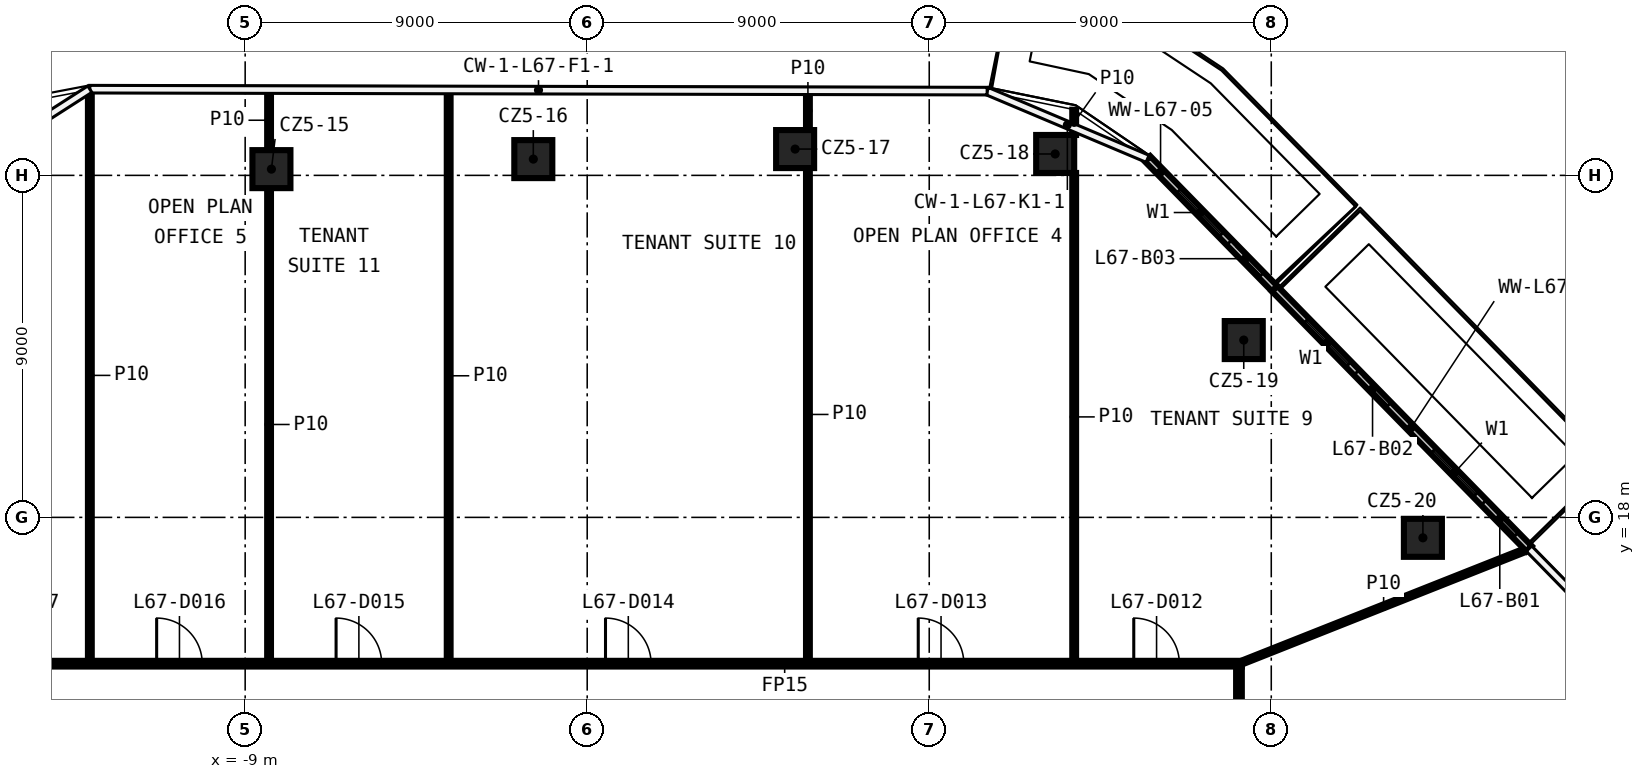
"""IFC4 building model, lengths in metres.
Left out: names, types, materials, properties, quantities, classifications, styles, units other than length and angle.
Written with IfcOpenShell. Run it as: python <this file> out.ifc"""

import sys

from ifc_helpers import new_model, si_unit, direction, frame, frame_2d, origin, origin_2d, place, context, subcontext, project, spatial, rectangle, extrude, element, fill, save


model = new_model("IFC4")
c1 = context("Model", 3, precision=1e-05, world=origin(), true_north=direction((0.0, 1.0)))
c2 = subcontext(c1, "Body", "Model", "MODEL_VIEW")
j1 = project(units=[si_unit("LENGTHUNIT", "METRE"), si_unit("PLANEANGLEUNIT", "RADIAN")], contexts=[c1])
p1 = place(None, origin())
s1 = spatial("IfcSite", under=j1, at=p1, CompositionType="ELEMENT")
p2 = place(p1, origin())
s2 = spatial("IfcBuilding", under=s1, at=p2, CompositionType="ELEMENT")
p3 = place(p2, frame((0.0, 0.0, 315.2)))
s3 = spatial("IfcBuildingStorey", under=s2, at=p3, CompositionType="ELEMENT", Elevation=315.2)
for number, where, z_axis, x_axis in (
    (1, (-8.309, 27.164, 0.0), (0.0, 0.0, 1.0), (1.0, 0.0, 0.0)),
    (2, (-1.418, 27.428, 0.0), (0.0, 0.0, 1.0), (1.0, 0.0, 0.0)),
    (3, (5.471, 27.692, 0.0), (0.0, 0.0, 1.0), (1.0, 0.0, 0.0)),
    (4, (12.314, 27.563, 0.0), (0.0, 0.0, 1.0), (1.0, 0.0, 0.0)),
    (5, (17.276, 22.666, 0.0), (0.0, 0.0, 1.0), (1.0, 0.0, 0.0)),
    (6, (21.99, 17.462, 0.0), (0.0, 0.0, 1.0), (1.0, 0.0, 0.0)),
):
    element("IfcColumn", number, at=place(p3, frame(where, z_axis=z_axis, x_axis=x_axis)), inside=s3, PredefinedType="COLUMN", context=c2, shape_type="SweptSolid", body=[
        extrude(rectangle(XDim=1.0, YDim=1.0, at=origin_2d()), origin(), (0.0, 0.0, 1.0), 3.82),
    ])
p4 = place(p3, frame((-17.225, 14.15, 0.0), z_axis=(0.0, 0.0, 1.0), x_axis=(1.0, 0.0, 0.0)))
e7 = element("IfcWall", 7, at=p4, inside=s3, PredefinedType="PARTITIONING", context=c2, shape_type="SweptSolid", body=[
    extrude(rectangle(XDim=34.45, YDim=0.15, at=frame_2d((17.225, 0.0))), origin(), (0.0, 0.0, 1.0), 3.82),
])
p5 = place(p4, frame((31.607, 0.0, 0.0)))
e8 = element("IfcOpeningElement", 8, at=p5, cuts=e7, PredefinedType="OPENING", context=c2, shape_type="SweptSolid", body=[
    extrude(rectangle(XDim=1.2, YDim=2.1, at=frame_2d((0.6, 1.05))), frame((0.0, 0.085, 0.0), z_axis=(0.0, -1.0, 0.0), x_axis=(1.0, 0.0, 0.0)), (0.0, 0.0, 1.0), 0.17),
])
p6 = place(p4, frame((25.936, 0.0, 0.0)))
e9 = element("IfcOpeningElement", 9, at=p6, cuts=e7, PredefinedType="OPENING", context=c2, shape_type="SweptSolid", body=[
    extrude(rectangle(XDim=1.2, YDim=2.1, at=frame_2d((0.6, 1.05))), frame((0.0, 0.085, 0.0), z_axis=(0.0, -1.0, 0.0), x_axis=(1.0, 0.0, 0.0)), (0.0, 0.0, 1.0), 0.17),
])
p7 = place(p4, frame((17.707, 0.0, 0.0)))
e10 = element("IfcOpeningElement", 10, at=p7, cuts=e7, PredefinedType="OPENING", context=c2, shape_type="SweptSolid", body=[
    extrude(rectangle(XDim=1.2, YDim=2.1, at=frame_2d((0.6, 1.05))), frame((0.0, 0.085, 0.0), z_axis=(0.0, -1.0, 0.0), x_axis=(1.0, 0.0, 0.0)), (0.0, 0.0, 1.0), 0.17),
])
p8 = place(p4, frame((10.617, 0.0, 0.0)))
e11 = element("IfcOpeningElement", 11, at=p8, cuts=e7, PredefinedType="OPENING", context=c2, shape_type="SweptSolid", body=[
    extrude(rectangle(XDim=1.2, YDim=2.1, at=frame_2d((0.6, 1.05))), frame((0.0, 0.085, 0.0), z_axis=(0.0, -1.0, 0.0), x_axis=(1.0, 0.0, 0.0)), (0.0, 0.0, 1.0), 0.17),
])
p9 = place(p4, frame((5.896, 0.0, 0.0)))
e12 = element("IfcOpeningElement", 12, at=p9, cuts=e7, PredefinedType="OPENING", context=c2, shape_type="SweptSolid", body=[
    extrude(rectangle(XDim=1.2, YDim=2.1, at=frame_2d((0.6, 1.05))), frame((0.0, 0.085, 0.0), z_axis=(0.0, -1.0, 0.0), x_axis=(1.0, 0.0, 0.0)), (0.0, 0.0, 1.0), 0.17),
])
p10 = place(p4, frame((1.506, 0.0, 0.0)))
e13 = element("IfcOpeningElement", 13, at=p10, cuts=e7, PredefinedType="OPENING", context=c2, shape_type="SweptSolid", body=[
    extrude(rectangle(XDim=1.2, YDim=2.1, at=frame_2d((0.6, 1.05))), frame((0.0, 0.085, 0.0), z_axis=(0.0, -1.0, 0.0), x_axis=(1.0, 0.0, 0.0)), (0.0, 0.0, 1.0), 0.17),
])
p11 = place(p3, frame((17.15, 14.15, 0.0), z_axis=(0.0, 0.0, 1.0), x_axis=(0.92958283513, 0.368613283308, 0.0)))
e14 = element("IfcWall", 14, at=p11, inside=s3, PredefinedType="PARTITIONING", context=c2, shape_type="SweptSolid", body=[
    extrude(rectangle(XDim=8.189, YDim=0.1, at=frame_2d((4.094, 0.0))), origin(), (0.0, 0.0, 1.0), 3.82),
])
p12 = place(p3, frame((17.15, 14.075, 0.0), z_axis=(0.0, 0.0, 1.0), x_axis=(0.0, -1.0, 0.0)))
e15 = element("IfcWall", 15, at=p12, inside=s3, PredefinedType="PARTITIONING", context=c2, shape_type="SweptSolid", body=[
    extrude(rectangle(XDim=28.15, YDim=0.15, at=frame_2d((14.075, 0.0))), origin(), (0.0, 0.0, 1.0), 3.82),
])
p13 = place(p12, frame((18.182, 0.0, 0.0)))
e16 = element("IfcOpeningElement", 16, at=p13, cuts=e15, PredefinedType="OPENING", context=c2, shape_type="SweptSolid", body=[
    extrude(rectangle(XDim=1.2, YDim=2.1, at=frame_2d((0.6, 1.05))), frame((0.0, 0.085, 0.0), z_axis=(0.0, -1.0, 0.0), x_axis=(1.0, 0.0, 0.0)), (0.0, 0.0, 1.0), 0.17),
])
p14 = place(p12, frame((10.811, 0.0, 0.0)))
e17 = element("IfcOpeningElement", 17, at=p14, cuts=e15, PredefinedType="OPENING", context=c2, shape_type="SweptSolid", body=[
    extrude(rectangle(XDim=1.2, YDim=2.1, at=frame_2d((0.6, 1.05))), frame((0.0, 0.085, 0.0), z_axis=(0.0, -1.0, 0.0), x_axis=(1.0, 0.0, 0.0)), (0.0, 0.0, 1.0), 0.17),
])
p15 = place(p12, frame((3.647, 0.0, 0.0)))
e18 = element("IfcOpeningElement", 18, at=p15, cuts=e15, PredefinedType="OPENING", context=c2, shape_type="SweptSolid", body=[
    extrude(rectangle(XDim=1.2, YDim=2.1, at=frame_2d((0.6, 1.05))), frame((0.0, 0.085, 0.0), z_axis=(0.0, -1.0, 0.0), x_axis=(1.0, 0.0, 0.0)), (0.0, 0.0, 1.0), 0.17),
])
p16 = place(p3, frame((12.814, 14.225, 0.0), z_axis=(0.0, 0.0, 1.0), x_axis=(0.0, 1.0, 0.0)))
e19 = element("IfcWall", 19, at=p16, inside=s3, PredefinedType="PARTITIONING", context=c2, shape_type="SweptSolid", body=[
    extrude(rectangle(XDim=12.838, YDim=0.1, at=frame_2d((6.419, 0.0))), origin(), (0.0, 0.0, 1.0), 3.82),
])
p17 = place(p3, frame((12.814, 28.063, 0.0), z_axis=(0.0, 0.0, 1.0), x_axis=(0.0, 1.0, 0.0)))
e20 = element("IfcWall", 20, at=p17, inside=s3, PredefinedType="PARTITIONING", context=c2, shape_type="SweptSolid", body=[
    extrude(rectangle(XDim=0.664, YDim=0.1, at=frame_2d((0.332, 0.0))), origin(), (0.0, 0.0, 1.0), 3.82),
])
p18 = place(p3, frame((5.808, 14.225, 0.0), z_axis=(0.0, 0.0, 1.0), x_axis=(0.0, 1.0, 0.0)))
e21 = element("IfcWall", 21, at=p18, inside=s3, PredefinedType="PARTITIONING", context=c2, shape_type="SweptSolid", body=[
    extrude(rectangle(XDim=12.967, YDim=0.1, at=frame_2d((6.483, 0.0))), origin(), (0.0, 0.0, 1.0), 3.82),
])
p19 = place(p3, frame((5.808, 28.192, 0.0), z_axis=(0.0, 0.0, 1.0), x_axis=(0.0, 1.0, 0.0)))
e22 = element("IfcWall", 22, at=p19, inside=s3, PredefinedType="PARTITIONING", context=c2, shape_type="SweptSolid", body=[
    extrude(rectangle(XDim=1.015, YDim=0.1, at=frame_2d((0.507, 0.0))), origin(), (0.0, 0.0, 1.0), 3.82),
])
p20 = place(p3, frame((-3.645, 14.225, 0.0), z_axis=(0.0, 0.0, 1.0), x_axis=(0.0, 1.0, 0.0)))
e23 = element("IfcWall", 23, at=p20, inside=s3, PredefinedType="PARTITIONING", context=c2, shape_type="SweptSolid", body=[
    extrude(rectangle(XDim=15.002, YDim=0.1, at=frame_2d((7.501, 0.0))), origin(), (0.0, 0.0, 1.0), 3.82),
])
p21 = place(p3, frame((-8.371, 14.225, 0.0), z_axis=(0.0, 0.0, 1.0), x_axis=(0.0, 1.0, 0.0)))
e24 = element("IfcWall", 24, at=p21, inside=s3, PredefinedType="PARTITIONING", context=c2, shape_type="SweptSolid", body=[
    extrude(rectangle(XDim=12.439, YDim=0.1, at=frame_2d((6.219, 0.0))), origin(), (0.0, 0.0, 1.0), 3.82),
])
p22 = place(p3, frame((-8.371, 27.664, 0.0), z_axis=(0.0, 0.0, 1.0), x_axis=(0.0, 1.0, 0.0)))
e25 = element("IfcWall", 25, at=p22, inside=s3, PredefinedType="PARTITIONING", context=c2, shape_type="SweptSolid", body=[
    extrude(rectangle(XDim=1.574, YDim=0.1, at=frame_2d((0.787, 0.0))), origin(), (0.0, 0.0, 1.0), 3.82),
])
p23 = place(p3, frame((-13.087, 14.225, 0.0), z_axis=(0.0, 0.0, 1.0), x_axis=(0.0, 1.0, 0.0)))
e26 = element("IfcWall", 26, at=p23, inside=s3, PredefinedType="PARTITIONING", context=c2, shape_type="SweptSolid", body=[
    extrude(rectangle(XDim=15.023, YDim=0.1, at=frame_2d((7.511, 0.0))), origin(), (0.0, 0.0, 1.0), 3.82),
])
p24 = place(p3, frame((24.782, 17.177, 0.0), z_axis=(0.0, 0.0, 1.0), x_axis=(-0.699351369698, 0.714778050657, 0.0)))
e27 = element("IfcWall", 27, at=p24, inside=s3, PredefinedType="SOLIDWALL", context=c2, shape_type="SweptSolid", body=[
    extrude(rectangle(XDim=9.575, YDim=0.2, at=frame_2d((4.787, 0.0))), origin(), (0.0, 0.0, 1.0), 3.82),
])
p25 = place(p24, frame((2.0, 0.0, 0.6)))
e28 = element("IfcOpeningElement", 28, at=p25, cuts=e27, PredefinedType="OPENING", context=c2, shape_type="SweptSolid", body=[
    extrude(rectangle(XDim=1.6, YDim=2.4, at=frame_2d((0.8, 1.2))), frame((0.0, 0.11, 0.0), z_axis=(0.0, -1.0, 0.0), x_axis=(1.0, 0.0, 0.0)), (0.0, 0.0, 1.0), 0.22),
])
p26 = place(p24, frame((0.5, 0.0, 0.0)))
e29 = element("IfcOpeningElement", 29, at=p26, cuts=e27, PredefinedType="OPENING", context=c2, shape_type="SweptSolid", body=[
    extrude(rectangle(XDim=1.2, YDim=2.4, at=frame_2d((0.6, 1.2))), frame((0.0, 0.11, 0.0), z_axis=(0.0, -1.0, 0.0), x_axis=(1.0, 0.0, 0.0)), (0.0, 0.0, 1.0), 0.22),
])
p27 = place(p24, frame((6.787, 0.0, 0.6)))
e30 = element("IfcOpeningElement", 30, at=p27, cuts=e27, PredefinedType="OPENING", context=c2, shape_type="SweptSolid", body=[
    extrude(rectangle(XDim=1.6, YDim=2.4, at=frame_2d((0.8, 1.2))), frame((0.0, 0.11, 0.0), z_axis=(0.0, -1.0, 0.0), x_axis=(1.0, 0.0, 0.0)), (0.0, 0.0, 1.0), 0.22),
])
p28 = place(p24, frame((5.287, 0.0, 0.0)))
e31 = element("IfcOpeningElement", 31, at=p28, cuts=e27, PredefinedType="OPENING", context=c2, shape_type="SweptSolid", body=[
    extrude(rectangle(XDim=1.2, YDim=2.4, at=frame_2d((0.6, 1.2))), frame((0.0, 0.11, 0.0), z_axis=(0.0, -1.0, 0.0), x_axis=(1.0, 0.0, 0.0)), (0.0, 0.0, 1.0), 0.22),
])
p29 = place(p3, frame((18.086, 24.021, 0.0), z_axis=(0.0, 0.0, 1.0), x_axis=(-0.699373628804, 0.714756271279, 0.0)))
e32 = element("IfcWall", 32, at=p29, inside=s3, PredefinedType="SOLIDWALL", context=c2, shape_type="SweptSolid", body=[
    extrude(rectangle(XDim=4.777, YDim=0.2, at=frame_2d((2.389, 0.0))), origin(), (0.0, 0.0, 1.0), 3.82),
])
p30 = place(p29, frame((2.0, 0.0, 0.6)))
e33 = element("IfcOpeningElement", 33, at=p30, cuts=e32, PredefinedType="OPENING", context=c2, shape_type="SweptSolid", body=[
    extrude(rectangle(XDim=1.6, YDim=2.4, at=frame_2d((0.8, 1.2))), frame((0.0, 0.11, 0.0), z_axis=(0.0, -1.0, 0.0), x_axis=(1.0, 0.0, 0.0)), (0.0, 0.0, 1.0), 0.22),
])
p31 = place(p29, frame((0.5, 0.0, 0.0)))
e34 = element("IfcOpeningElement", 34, at=p31, cuts=e32, PredefinedType="OPENING", context=c2, shape_type="SweptSolid", body=[
    extrude(rectangle(XDim=1.2, YDim=2.4, at=frame_2d((0.6, 1.2))), frame((0.0, 0.11, 0.0), z_axis=(0.0, -1.0, 0.0), x_axis=(1.0, 0.0, 0.0)), (0.0, 0.0, 1.0), 0.22),
])
p32 = place(p5, origin())
e35 = element("IfcDoor", 35, at=p32, inside=s3, OperationType="SINGLE_SWING_LEFT", PredefinedType="DOOR", context=c2, shape_type="SweptSolid", body=[
    extrude(rectangle(XDim=1.2, YDim=2.1, at=frame_2d((0.6, 1.05))), frame((0.0, 0.025, 0.0), z_axis=(0.0, -1.0, 0.0), x_axis=(1.0, 0.0, 0.0)), (0.0, 0.0, 1.0), 0.05),
])
fill(e8, e35)
p33 = place(p6, origin())
e36 = element("IfcDoor", 36, at=p33, inside=s3, OperationType="SINGLE_SWING_RIGHT", PredefinedType="DOOR", context=c2, shape_type="SweptSolid", body=[
    extrude(rectangle(XDim=1.2, YDim=2.1, at=frame_2d((0.6, 1.05))), frame((0.0, 0.025, 0.0), z_axis=(0.0, -1.0, 0.0), x_axis=(1.0, 0.0, 0.0)), (0.0, 0.0, 1.0), 0.05),
])
fill(e9, e36)
p34 = place(p7, origin())
e37 = element("IfcDoor", 37, at=p34, inside=s3, OperationType="SINGLE_SWING_LEFT", PredefinedType="DOOR", context=c2, shape_type="SweptSolid", body=[
    extrude(rectangle(XDim=1.2, YDim=2.1, at=frame_2d((0.6, 1.05))), frame((0.0, 0.025, 0.0), z_axis=(0.0, -1.0, 0.0), x_axis=(1.0, 0.0, 0.0)), (0.0, 0.0, 1.0), 0.05),
])
fill(e10, e37)
p35 = place(p8, origin())
e38 = element("IfcDoor", 38, at=p35, inside=s3, OperationType="SINGLE_SWING_RIGHT", PredefinedType="DOOR", context=c2, shape_type="SweptSolid", body=[
    extrude(rectangle(XDim=1.2, YDim=2.1, at=frame_2d((0.6, 1.05))), frame((0.0, 0.025, 0.0), z_axis=(0.0, -1.0, 0.0), x_axis=(1.0, 0.0, 0.0)), (0.0, 0.0, 1.0), 0.05),
])
fill(e11, e38)
p36 = place(p9, origin())
e39 = element("IfcDoor", 39, at=p36, inside=s3, OperationType="SINGLE_SWING_LEFT", PredefinedType="DOOR", context=c2, shape_type="SweptSolid", body=[
    extrude(rectangle(XDim=1.2, YDim=2.1, at=frame_2d((0.6, 1.05))), frame((0.0, 0.025, 0.0), z_axis=(0.0, -1.0, 0.0), x_axis=(1.0, 0.0, 0.0)), (0.0, 0.0, 1.0), 0.05),
])
fill(e12, e39)
p37 = place(p25, origin())
e40 = element("IfcWindow", 40, at=p37, inside=s3, PartitioningType="SINGLE_PANEL", PredefinedType="WINDOW", context=c2, shape_type="SweptSolid", body=[
    extrude(rectangle(XDim=1.6, YDim=2.4, at=frame_2d((0.8, 1.2))), frame((0.0, 0.03, 0.0), z_axis=(0.0, -1.0, 0.0), x_axis=(1.0, 0.0, 0.0)), (0.0, 0.0, 1.0), 0.06),
])
fill(e28, e40)
p38 = place(p26, origin())
e41 = element("IfcDoor", 41, at=p38, inside=s3, OperationType="SLIDING_TO_LEFT", PredefinedType="DOOR", context=c2, shape_type="SweptSolid", body=[
    extrude(rectangle(XDim=1.2, YDim=2.4, at=frame_2d((0.6, 1.2))), frame((0.0, 0.025, 0.0), z_axis=(0.0, -1.0, 0.0), x_axis=(1.0, 0.0, 0.0)), (0.0, 0.0, 1.0), 0.05),
])
fill(e29, e41)
p39 = place(p27, origin())
e42 = element("IfcWindow", 42, at=p39, inside=s3, PartitioningType="SINGLE_PANEL", PredefinedType="WINDOW", context=c2, shape_type="SweptSolid", body=[
    extrude(rectangle(XDim=1.6, YDim=2.4, at=frame_2d((0.8, 1.2))), frame((0.0, 0.03, 0.0), z_axis=(0.0, -1.0, 0.0), x_axis=(1.0, 0.0, 0.0)), (0.0, 0.0, 1.0), 0.06),
])
fill(e30, e42)
p40 = place(p28, origin())
e43 = element("IfcDoor", 43, at=p40, inside=s3, OperationType="SLIDING_TO_LEFT", PredefinedType="DOOR", context=c2, shape_type="SweptSolid", body=[
    extrude(rectangle(XDim=1.2, YDim=2.4, at=frame_2d((0.6, 1.2))), frame((0.0, 0.025, 0.0), z_axis=(0.0, -1.0, 0.0), x_axis=(1.0, 0.0, 0.0)), (0.0, 0.0, 1.0), 0.05),
])
fill(e31, e43)
p41 = place(p30, origin())
e44 = element("IfcWindow", 44, at=p41, inside=s3, PartitioningType="SINGLE_PANEL", PredefinedType="WINDOW", context=c2, shape_type="SweptSolid", body=[
    extrude(rectangle(XDim=1.6, YDim=2.4, at=frame_2d((0.8, 1.2))), frame((0.0, 0.03, 0.0), z_axis=(0.0, -1.0, 0.0), x_axis=(1.0, 0.0, 0.0)), (0.0, 0.0, 1.0), 0.06),
])
fill(e33, e44)
p42 = place(p31, origin())
e45 = element("IfcDoor", 45, at=p42, inside=s3, OperationType="SLIDING_TO_LEFT", PredefinedType="DOOR", context=c2, shape_type="SweptSolid", body=[
    extrude(rectangle(XDim=1.2, YDim=2.4, at=frame_2d((0.6, 1.2))), frame((0.0, 0.025, 0.0), z_axis=(0.0, -1.0, 0.0), x_axis=(1.0, 0.0, 0.0)), (0.0, 0.0, 1.0), 0.05),
])
fill(e34, e45)
save(model, sys.argv[1])
